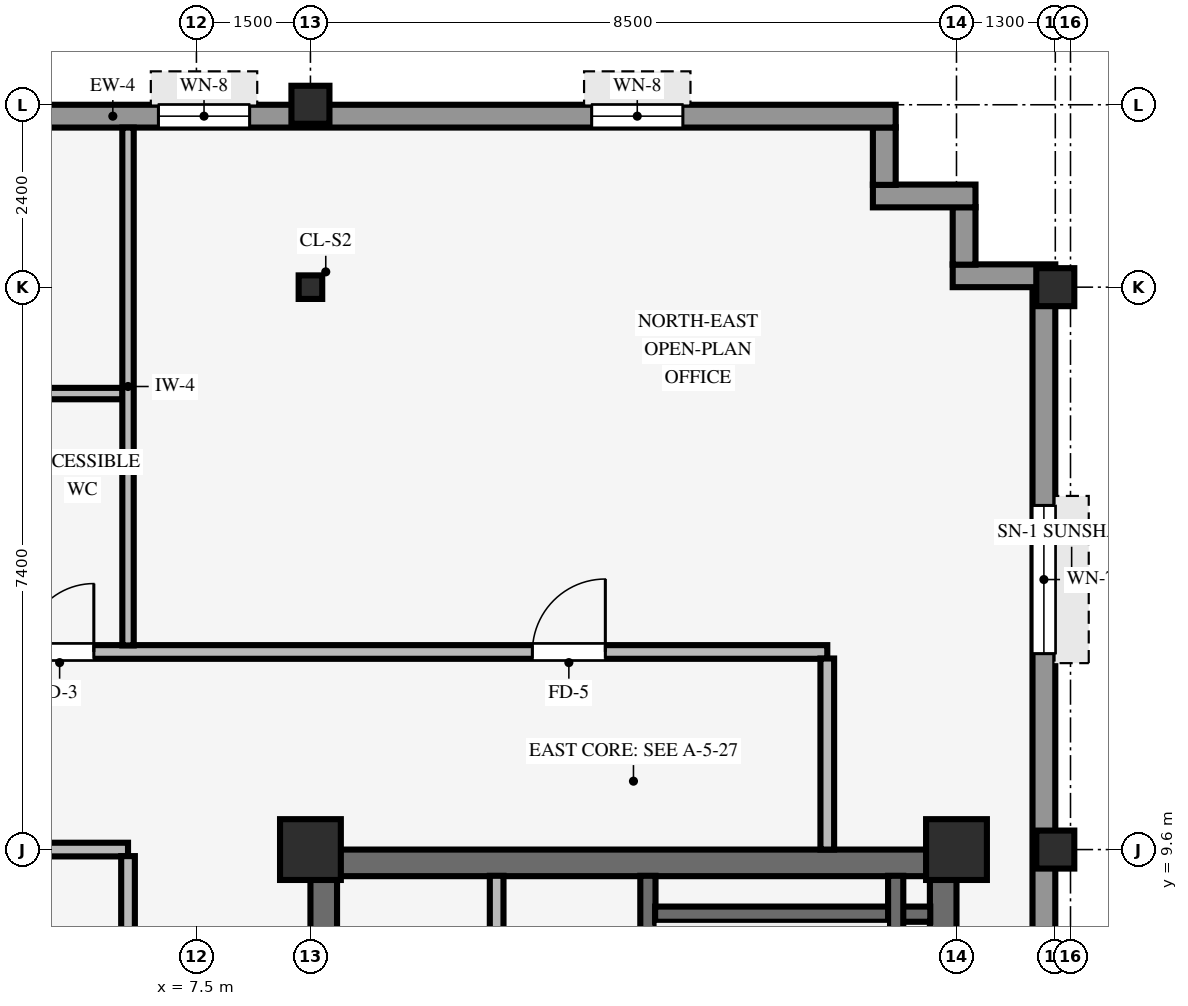
"""IFC4 building model, lengths in metres.
Left out: names, types, materials, properties, quantities, classifications, styles, units other than length and angle.
Written with IfcOpenShell. Run it as: python <this file> out.ifc"""

import sys

from ifc_helpers import new_model, si_unit, direction, frame, frame_2d, origin, origin_2d, place, context, subcontext, project, spatial, rectangle, hollow_rectangle, i_section, extrude, source, transform, mapped, element, fill, save


model = new_model("IFC4")
c1 = context("Model", 3, precision=1e-05, world=origin(), true_north=direction((0.0, 1.0)))
c2 = subcontext(c1, "Body", "Model", "MODEL_VIEW")
j1 = project(units=[si_unit("LENGTHUNIT", "METRE"), si_unit("PLANEANGLEUNIT", "RADIAN")], contexts=[c1])
p1 = place(None, origin())
s1 = spatial("IfcSite", under=j1, at=p1, CompositionType="ELEMENT")
p2 = place(p1, origin())
s2 = spatial("IfcBuilding", under=s1, at=p2, CompositionType="ELEMENT")
p3 = place(p2, frame((0.0, 0.0, 249.3)))
s3 = spatial("IfcBuildingStorey", under=s2, at=p3, CompositionType="ELEMENT", Elevation=249.3)
p4 = place(p3, frame((9.0, 9.425, 0.0), z_axis=(0.0, 0.0, 1.0), x_axis=(1.0, 0.0, 0.0)))
e1 = element("IfcWall", 1, at=p4, inside=s3, PredefinedType="SHEAR", context=c2, shape_type="SweptSolid", body=[
    extrude(rectangle(XDim=8.5, YDim=0.35, at=frame_2d((4.25, 0.0))), origin(), (0.0, 0.0, 1.0), 3.25),
])
p5 = place(p3, frame((9.175, -9.255, 0.0), z_axis=(0.0, 0.0, 1.0), x_axis=(0.0, 1.0, 0.0)))
e2 = element("IfcWall", 2, at=p5, inside=s3, PredefinedType="SHEAR", context=c2, shape_type="SweptSolid", body=[
    extrude(rectangle(XDim=18.51, YDim=0.35, at=frame_2d((9.255, 0.0))), origin(), (0.0, 0.0, 1.0), 3.25),
])
p6 = place(p5, frame((8.655, 0.0, 0.0)))
e3 = element("IfcOpeningElement", 3, at=p6, cuts=e2, PredefinedType="OPENING", context=c2, shape_type="SweptSolid", body=[
    extrude(rectangle(XDim=1.2, YDim=2.15, at=frame_2d((0.6, 1.075))), frame((0.0, 0.185, 0.0), z_axis=(0.0, -1.0, 0.0), x_axis=(1.0, 0.0, 0.0)), (0.0, 0.0, 1.0), 0.37),
])
p7 = place(p3, frame((17.325, -9.255, 0.0), z_axis=(0.0, 0.0, 1.0), x_axis=(0.0, 1.0, 0.0)))
e4 = element("IfcWall", 4, at=p7, inside=s3, PredefinedType="SHEAR", context=c2, shape_type="SweptSolid", body=[
    extrude(rectangle(XDim=18.51, YDim=0.35, at=frame_2d((9.255, 0.0))), origin(), (0.0, 0.0, 1.0), 3.25),
])
for number, where, z_axis, x_axis in (
    (5, (9.0, 9.6, 0.0), (0.0, 0.0, 1.0), (1.0, 0.0, 0.0)),
    (6, (17.5, 9.6, 0.0), (0.0, 0.0, 1.0), (1.0, 0.0, 0.0)),
):
    element("IfcColumn", number, at=place(p3, frame(where, z_axis=z_axis, x_axis=x_axis)), inside=s3, PredefinedType="COLUMN", context=c2, shape_type="SweptSolid", body=[
        extrude(rectangle(XDim=0.8, YDim=0.8, at=origin_2d()), origin(), (0.0, 0.0, 1.0), 3.25),
    ])
for number, where, z_axis, x_axis in (
    (7, (18.8, 9.6, 0.0), (0.0, 0.0, 1.0), (1.0, 0.0, 0.0)),
    (8, (18.8, 17.0, 0.0), (0.0, 0.0, 1.0), (1.0, 0.0, 0.0)),
    (9, (9.0, 19.4, 0.0), (0.0, 0.0, 1.0), (1.0, 0.0, 0.0)),
):
    element("IfcColumn", number, at=place(p3, frame(where, z_axis=z_axis, x_axis=x_axis)), inside=s3, PredefinedType="COLUMN", context=c2, shape_type="SweptSolid", body=[
        extrude(hollow_rectangle(XDim=0.5, YDim=0.5, WallThickness=0.032, InnerFilletRadius=0.032, OuterFilletRadius=0.064, at=origin_2d()), origin(), (0.0, 0.0, 1.0), 3.25),
    ])
p8 = place(p3, frame((9.0, 17.0, 0.0), z_axis=(0.0, 0.0, 1.0), x_axis=(1.0, 0.0, 0.0)))
e10 = element("IfcColumn", 10, at=p8, inside=s3, PredefinedType="COLUMN", context=c2, shape_type="SweptSolid", body=[
    extrude(i_section(OverallWidth=0.31, OverallDepth=0.31, WebThickness=0.015, FlangeThickness=0.015, FilletRadius=0.015, at=origin_2d()), origin(), (0.0, 0.0, 1.0), 3.25),
])
p9 = place(p3, frame((18.65, 3.6, 0.0), z_axis=(0.0, 0.0, 1.0), x_axis=(0.0, 1.0, 0.0)))
e11 = element("IfcWall", 11, at=p9, inside=s3, PredefinedType="STANDARD", context=c2, shape_type="SweptSolid", body=[
    extrude(rectangle(XDim=13.404, YDim=0.3, at=frame_2d((6.702, 0.0))), origin(), (0.0, 0.0, 1.0), 2.585),
])
p10 = place(p9, frame((8.578, 0.0, 0.8)))
e12 = element("IfcOpeningElement", 12, at=p10, cuts=e11, PredefinedType="OPENING", context=c2, shape_type="SweptSolid", body=[
    extrude(rectangle(XDim=1.95, YDim=1.48, at=frame_2d((0.975, 0.74))), frame((0.0, 0.16, 0.0), z_axis=(0.0, -1.0, 0.0), x_axis=(1.0, 0.0, 0.0)), (0.0, 0.0, 1.0), 0.32),
])
p11 = place(p3, frame((17.45, 17.15, 0.0), z_axis=(0.0, 0.0, 1.0), x_axis=(1.0, 0.0, 0.0)))
e13 = element("IfcWall", 13, at=p11, inside=s3, PredefinedType="STANDARD", context=c2, shape_type="SweptSolid", body=[
    extrude(rectangle(XDim=1.35, YDim=0.3, at=frame_2d((0.675, 0.0))), origin(), (0.0, 0.0, 1.0), 2.335),
])
p12 = place(p3, frame((17.6, 17.296, 0.0), z_axis=(0.0, 0.0, 1.0), x_axis=(0.0, 1.0, 0.0)))
e14 = element("IfcWall", 14, at=p12, inside=s3, PredefinedType="STANDARD", context=c2, shape_type="SweptSolid", body=[
    extrude(rectangle(XDim=0.758, YDim=0.3, at=frame_2d((0.379, 0.0))), origin(), (0.0, 0.0, 1.0), 2.335),
])
p13 = place(p3, frame((16.4, 18.2, 0.0), z_axis=(0.0, 0.0, 1.0), x_axis=(1.0, 0.0, 0.0)))
e15 = element("IfcWall", 15, at=p13, inside=s3, PredefinedType="STANDARD", context=c2, shape_type="SweptSolid", body=[
    extrude(rectangle(XDim=1.35, YDim=0.3, at=frame_2d((0.675, 0.0))), origin(), (0.0, 0.0, 1.0), 2.335),
])
p14 = place(p3, frame((16.55, 18.346, 0.0), z_axis=(0.0, 0.0, 1.0), x_axis=(0.0, 1.0, 0.0)))
e16 = element("IfcWall", 16, at=p14, inside=s3, PredefinedType="STANDARD", context=c2, shape_type="SweptSolid", body=[
    extrude(rectangle(XDim=0.758, YDim=0.3, at=frame_2d((0.379, 0.0))), origin(), (0.0, 0.0, 1.0), 2.335),
])
p15 = place(p3, frame((-18.9, 19.25, 0.0), z_axis=(0.0, 0.0, 1.0), x_axis=(1.0, 0.0, 0.0)))
e17 = element("IfcWall", 17, at=p15, inside=s3, PredefinedType="STANDARD", context=c2, shape_type="SweptSolid", body=[
    extrude(rectangle(XDim=35.6, YDim=0.3, at=frame_2d((17.8, 0.0))), origin(), (0.0, 0.0, 1.0), 2.585),
])
p16 = place(p15, frame((13.5, 0.0, 0.0)))
e18 = element("IfcOpeningElement", 18, at=p16, cuts=e17, PredefinedType="OPENING", context=c2, shape_type="SweptSolid", body=[
    extrude(rectangle(XDim=1.05, YDim=2.1, at=frame_2d((0.525, 1.05))), frame((0.0, 0.16, 0.0), z_axis=(0.0, -1.0, 0.0), x_axis=(1.0, 0.0, 0.0)), (0.0, 0.0, 1.0), 0.32),
])
p17 = place(p15, frame((2.35, 0.0, 0.8)))
e19 = element("IfcOpeningElement", 19, at=p17, cuts=e17, PredefinedType="OPENING", context=c2, shape_type="SweptSolid", body=[
    extrude(rectangle(XDim=1.2, YDim=1.48, at=frame_2d((0.6, 0.74))), frame((0.0, 0.16, 0.0), z_axis=(0.0, -1.0, 0.0), x_axis=(1.0, 0.0, 0.0)), (0.0, 0.0, 1.0), 0.32),
])
p18 = place(p15, frame((7.6, 0.0, 0.8)))
e20 = element("IfcOpeningElement", 20, at=p18, cuts=e17, PredefinedType="OPENING", context=c2, shape_type="SweptSolid", body=[
    extrude(rectangle(XDim=1.2, YDim=1.48, at=frame_2d((0.6, 0.74))), frame((0.0, 0.16, 0.0), z_axis=(0.0, -1.0, 0.0), x_axis=(1.0, 0.0, 0.0)), (0.0, 0.0, 1.0), 0.32),
])
p19 = place(p15, frame((16.75, 0.0, 0.8)))
e21 = element("IfcOpeningElement", 21, at=p19, cuts=e17, PredefinedType="OPENING", context=c2, shape_type="SweptSolid", body=[
    extrude(rectangle(XDim=1.2, YDim=1.48, at=frame_2d((0.6, 0.74))), frame((0.0, 0.16, 0.0), z_axis=(0.0, -1.0, 0.0), x_axis=(1.0, 0.0, 0.0)), (0.0, 0.0, 1.0), 0.32),
])
p20 = place(p15, frame((22.0, 0.0, 0.8)))
e22 = element("IfcOpeningElement", 22, at=p20, cuts=e17, PredefinedType="OPENING", context=c2, shape_type="SweptSolid", body=[
    extrude(rectangle(XDim=1.2, YDim=1.48, at=frame_2d((0.6, 0.74))), frame((0.0, 0.16, 0.0), z_axis=(0.0, -1.0, 0.0), x_axis=(1.0, 0.0, 0.0)), (0.0, 0.0, 1.0), 0.32),
])
p21 = place(p15, frame((25.9, 0.0, 0.8)))
e23 = element("IfcOpeningElement", 23, at=p21, cuts=e17, PredefinedType="OPENING", context=c2, shape_type="SweptSolid", body=[
    extrude(rectangle(XDim=1.2, YDim=1.48, at=frame_2d((0.6, 0.74))), frame((0.0, 0.16, 0.0), z_axis=(0.0, -1.0, 0.0), x_axis=(1.0, 0.0, 0.0)), (0.0, 0.0, 1.0), 0.32),
])
p22 = place(p15, frame((31.6, 0.0, 0.8)))
e24 = element("IfcOpeningElement", 24, at=p22, cuts=e17, PredefinedType="OPENING", context=c2, shape_type="SweptSolid", body=[
    extrude(rectangle(XDim=1.2, YDim=1.48, at=frame_2d((0.6, 0.74))), frame((0.0, 0.16, 0.0), z_axis=(0.0, -1.0, 0.0), x_axis=(1.0, 0.0, 0.0)), (0.0, 0.0, 1.0), 0.32),
])
p23 = place(p3, frame((13.44, 0.9, 0.0), z_axis=(0.0, 0.0, 1.0), x_axis=(0.0, 1.0, 0.0)))
e25 = element("IfcWall", 25, at=p23, inside=s3, PredefinedType="SHEAR", context=c2, shape_type="SweptSolid", body=[
    extrude(rectangle(XDim=8.355, YDim=0.2, at=frame_2d((4.177, 0.0))), origin(), (0.0, 0.0, 1.0), 3.25),
])
p24 = place(p23, frame((0.43, 0.0, 0.0)))
e26 = element("IfcOpeningElement", 26, at=p24, cuts=e25, PredefinedType="OPENING", context=c2, shape_type="SweptSolid", body=[
    extrude(rectangle(XDim=1.1, YDim=2.15, at=frame_2d((0.55, 1.075))), frame((0.0, 0.11, 0.0), z_axis=(0.0, -1.0, 0.0), x_axis=(1.0, 0.0, 0.0)), (0.0, 0.0, 1.0), 0.22),
])
p25 = place(p3, frame((13.535, 8.75, 0.0), z_axis=(0.0, 0.0, 1.0), x_axis=(1.0, 0.0, 0.0)))
e27 = element("IfcWall", 27, at=p25, inside=s3, PredefinedType="SHEAR", context=c2, shape_type="SweptSolid", body=[
    extrude(rectangle(XDim=3.62, YDim=0.2, at=frame_2d((1.81, 0.0))), origin(), (0.0, 0.0, 1.0), 3.25),
])
p26 = place(p3, frame((16.7, 1.095, 0.0), z_axis=(0.0, 0.0, 1.0), x_axis=(0.0, 1.0, 0.0)))
e28 = element("IfcWall", 28, at=p26, inside=s3, PredefinedType="SHEAR", context=c2, shape_type="SweptSolid", body=[
    extrude(rectangle(XDim=8.16, YDim=0.2, at=frame_2d((4.08, 0.0))), origin(), (0.0, 0.0, 1.0), 3.25),
])
p27 = place(p3, frame((11.45, 1.49, 0.0), z_axis=(0.0, 0.0, 1.0), x_axis=(0.0, 1.0, 0.0)))
e29 = element("IfcWall", 29, at=p27, inside=s3, PredefinedType="PARTITIONING", context=c2, shape_type="SweptSolid", body=[
    extrude(rectangle(XDim=7.765, YDim=0.18, at=frame_2d((3.882, 0.0))), origin(), (0.0, 0.0, 1.0), 3.24),
])
p28 = place(p3, frame((0.151, 9.6, 0.0), z_axis=(0.0, 0.0, 1.0), x_axis=(1.0, 0.0, 0.0)))
e30 = element("IfcWall", 30, at=p28, inside=s3, PredefinedType="PARTITIONING", context=c2, shape_type="SweptSolid", body=[
    extrude(rectangle(XDim=6.449, YDim=0.18, at=frame_2d((3.225, 0.0))), origin(), (0.0, 0.0, 1.0), 2.285),
])
p29 = place(p3, frame((-14.8, 12.2, 0.0), z_axis=(0.0, 0.0, 1.0), x_axis=(1.0, 0.0, 0.0)))
e31 = element("IfcWall", 31, at=p29, inside=s3, PredefinedType="PARTITIONING", context=c2, shape_type="SweptSolid", body=[
    extrude(rectangle(XDim=30.6, YDim=0.18, at=frame_2d((15.3, 0.0))), origin(), (0.0, 0.0, 1.0), 3.24),
])
p30 = place(p29, frame((11.32, 0.0, 0.0)))
e32 = element("IfcOpeningElement", 32, at=p30, cuts=e31, PredefinedType="OPENING", context=c2, shape_type="SweptSolid", body=[
    extrude(rectangle(XDim=0.96, YDim=2.1, at=frame_2d((0.48, 1.05))), frame((0.0, 0.1, 0.0), z_axis=(0.0, -1.0, 0.0), x_axis=(1.0, 0.0, 0.0)), (0.0, 0.0, 1.0), 0.2),
])
p31 = place(p29, frame((26.72, 0.0, 0.0)))
e33 = element("IfcOpeningElement", 33, at=p31, cuts=e31, PredefinedType="OPENING", context=c2, shape_type="SweptSolid", body=[
    extrude(rectangle(XDim=0.96, YDim=2.1, at=frame_2d((0.48, 1.05))), frame((0.0, 0.1, 0.0), z_axis=(0.0, -1.0, 0.0), x_axis=(1.0, 0.0, 0.0)), (0.0, 0.0, 1.0), 0.2),
])
p32 = place(p29, frame((2.42, 0.0, 0.0)))
e34 = element("IfcOpeningElement", 34, at=p32, cuts=e31, PredefinedType="OPENING", context=c2, shape_type="SweptSolid", body=[
    extrude(rectangle(XDim=0.96, YDim=2.1, at=frame_2d((0.48, 1.05))), frame((0.0, 0.1, 0.0), z_axis=(0.0, -1.0, 0.0), x_axis=(1.0, 0.0, 0.0)), (0.0, 0.0, 1.0), 0.2),
])
p33 = place(p29, frame((16.0, 0.0, 0.0)))
e35 = element("IfcOpeningElement", 35, at=p33, cuts=e31, PredefinedType="OPENING", context=c2, shape_type="SweptSolid", body=[
    extrude(rectangle(XDim=0.9, YDim=2.1, at=frame_2d((0.45, 1.05))), frame((0.0, 0.1, 0.0), z_axis=(0.0, -1.0, 0.0), x_axis=(1.0, 0.0, 0.0)), (0.0, 0.0, 1.0), 0.2),
])
p34 = place(p29, frame((18.1, 0.0, 0.0)))
e36 = element("IfcOpeningElement", 36, at=p34, cuts=e31, PredefinedType="OPENING", context=c2, shape_type="SweptSolid", body=[
    extrude(rectangle(XDim=0.9, YDim=2.1, at=frame_2d((0.45, 1.05))), frame((0.0, 0.1, 0.0), z_axis=(0.0, -1.0, 0.0), x_axis=(1.0, 0.0, 0.0)), (0.0, 0.0, 1.0), 0.2),
])
p35 = place(p29, frame((20.05, 0.0, 0.0)))
e37 = element("IfcOpeningElement", 37, at=p35, cuts=e31, PredefinedType="OPENING", context=c2, shape_type="SweptSolid", body=[
    extrude(rectangle(XDim=0.9, YDim=2.1, at=frame_2d((0.45, 1.05))), frame((0.0, 0.1, 0.0), z_axis=(0.0, -1.0, 0.0), x_axis=(1.0, 0.0, 0.0)), (0.0, 0.0, 1.0), 0.2),
])
p36 = place(p3, frame((0.6, 15.6, 0.0), z_axis=(0.0, 0.0, 1.0), x_axis=(1.0, 0.0, 0.0)))
e38 = element("IfcWall", 38, at=p36, inside=s3, PredefinedType="PARTITIONING", context=c2, shape_type="SweptSolid", body=[
    extrude(rectangle(XDim=5.929, YDim=0.15, at=frame_2d((2.964, 0.0))), origin(), (0.0, 0.0, 1.0), 3.24),
])
p37 = place(p3, frame((6.6, 1.336, 0.0), z_axis=(0.0, 0.0, 1.0), x_axis=(0.0, 1.0, 0.0)))
e39 = element("IfcWall", 39, at=p37, inside=s3, PredefinedType="PARTITIONING", context=c2, shape_type="SweptSolid", body=[
    extrude(rectangle(XDim=8.178, YDim=0.18, at=frame_2d((4.089, 0.0))), origin(), (0.0, 0.0, 1.0), 3.24),
])
p38 = place(p37, frame((3.609, 0.0, 0.0)))
e40 = element("IfcOpeningElement", 40, at=p38, cuts=e39, PredefinedType="OPENING", context=c2, shape_type="SweptSolid", body=[
    extrude(rectangle(XDim=0.96, YDim=2.1, at=frame_2d((0.48, 1.05))), frame((0.0, 0.1, 0.0), z_axis=(0.0, -1.0, 0.0), x_axis=(1.0, 0.0, 0.0)), (0.0, 0.0, 1.0), 0.2),
])
p39 = place(p3, frame((6.6, 12.286, 0.0), z_axis=(0.0, 0.0, 1.0), x_axis=(0.0, 1.0, 0.0)))
e41 = element("IfcWall", 41, at=p39, inside=s3, PredefinedType="PARTITIONING", context=c2, shape_type="SweptSolid", body=[
    extrude(rectangle(XDim=6.814, YDim=0.15, at=frame_2d((3.407, 0.0))), origin(), (0.0, 0.0, 1.0), 3.24),
])
p40 = place(p3, frame((15.8, 9.6, 0.0), z_axis=(0.0, 0.0, 1.0), x_axis=(0.0, 1.0, 0.0)))
e42 = element("IfcWall", 42, at=p40, inside=s3, PredefinedType="PARTITIONING", context=c2, shape_type="SweptSolid", body=[
    extrude(rectangle(XDim=2.514, YDim=0.18, at=frame_2d((1.257, 0.0))), origin(), (0.0, 0.0, 1.0), 3.24),
])
m1 = source(origin(), c2, "Body", "SweptSolid", [
    extrude(rectangle(XDim=1.95, YDim=1.48, at=frame_2d((0.975, 0.74))), frame((0.0, 0.03, 0.0), z_axis=(0.0, -1.0, 0.0), x_axis=(1.0, 0.0, 0.0)), (0.0, 0.0, 1.0), 0.06),
])
p41 = place(p10, origin())
e43 = element("IfcWindow", 43, at=p41, inside=s3, PartitioningType="SINGLE_PANEL", PredefinedType="WINDOW", context=c2, shape_type="MappedRepresentation", body=[
    mapped(m1, transform((0.0, 0.0, 0.0), scale=1.0)),
])
fill(e12, e43)
m2 = source(origin(), c2, "Body", "SweptSolid", [
    extrude(rectangle(XDim=1.2, YDim=1.48, at=frame_2d((0.6, 0.74))), frame((0.0, 0.03, 0.0), z_axis=(0.0, -1.0, 0.0), x_axis=(1.0, 0.0, 0.0)), (0.0, 0.0, 1.0), 0.06),
])
p42 = place(p21, origin())
e44 = element("IfcWindow", 44, at=p42, inside=s3, PartitioningType="SINGLE_PANEL", PredefinedType="WINDOW", context=c2, shape_type="MappedRepresentation", body=[
    mapped(m2, transform((0.0, 0.0, 0.0), scale=1.0)),
])
fill(e23, e44)
p43 = place(p22, origin())
e45 = element("IfcWindow", 45, at=p43, inside=s3, PartitioningType="SINGLE_PANEL", PredefinedType="WINDOW", context=c2, shape_type="MappedRepresentation", body=[
    mapped(m2, transform((0.0, 0.0, 0.0), scale=1.0)),
])
fill(e24, e45)
m3 = source(origin(), c2, "Body", "SweptSolid", [
    extrude(rectangle(XDim=0.96, YDim=2.1, at=frame_2d((0.48, 1.05))), frame((0.0, 0.025, 0.0), z_axis=(0.0, -1.0, 0.0), x_axis=(1.0, 0.0, 0.0)), (0.0, 0.0, 1.0), 0.05),
])
p44 = place(p31, origin())
e46 = element("IfcDoor", 46, at=p44, inside=s3, OperationType="SINGLE_SWING_RIGHT", PredefinedType="DOOR", context=c2, shape_type="MappedRepresentation", body=[
    mapped(m3, transform((0.0, 0.0, 0.0), scale=1.0)),
])
fill(e33, e46)
m4 = source(origin(), c2, "Body", "SweptSolid", [
    extrude(rectangle(XDim=0.9, YDim=2.1, at=frame_2d((0.45, 1.05))), frame((0.0, 0.025, 0.0), z_axis=(0.0, -1.0, 0.0), x_axis=(1.0, 0.0, 0.0)), (0.0, 0.0, 1.0), 0.05),
])
p45 = place(p35, origin())
e47 = element("IfcDoor", 47, at=p45, inside=s3, OperationType="SINGLE_SWING_RIGHT", PredefinedType="DOOR", context=c2, shape_type="MappedRepresentation", body=[
    mapped(m4, transform((0.0, 0.0, 0.0), scale=1.0)),
])
fill(e37, e47)
save(model, sys.argv[1])
